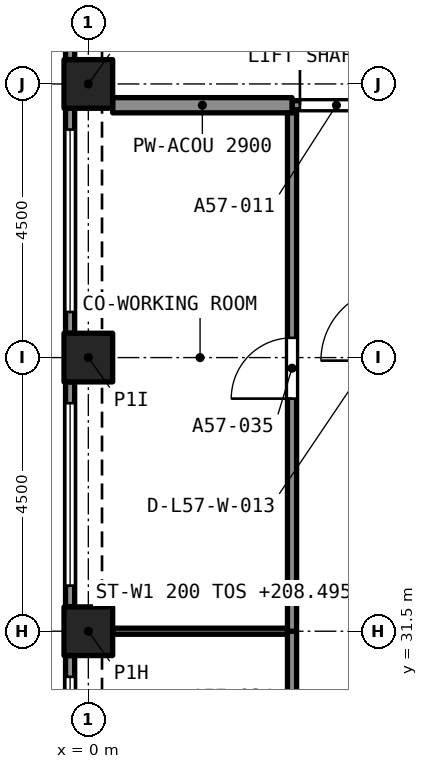
"""IFC4 building model, lengths in metres.
Left out: names, types, materials, properties, quantities, classifications, styles, units other than length and angle.
Written with IfcOpenShell. Run it as: python <this file> out.ifc"""

import sys

from ifc_helpers import new_model, si_unit, direction, frame, frame_2d, origin, origin_2d, place, context, subcontext, project, spatial, rectangle, extrude, element, fill, save


model = new_model("IFC4")
c1 = context("Model", 3, precision=1e-05, world=origin(), true_north=direction((0.0, 1.0)))
c2 = subcontext(c1, "Body", "Model", "MODEL_VIEW")
j1 = project(units=[si_unit("LENGTHUNIT", "METRE"), si_unit("PLANEANGLEUNIT", "RADIAN")], contexts=[c1])
p1 = place(None, origin())
s1 = spatial("IfcSite", under=j1, at=p1, CompositionType="ELEMENT")
p2 = place(p1, origin())
s2 = spatial("IfcBuilding", under=s1, at=p2, CompositionType="ELEMENT")
p3 = place(p2, frame((0.0, 0.0, 206.895)))
s3 = spatial("IfcBuildingStorey", under=s2, at=p3, CompositionType="ELEMENT", Elevation=206.895)
for number, where, z_axis, x_axis in (
    (1, (0.0, 31.5, 0.0), (0.0, 0.0, 1.0), (1.0, 0.0, 0.0)),
    (2, (0.0, 36.0, 0.0), (0.0, 0.0, 1.0), (1.0, 0.0, 0.0)),
    (3, (0.0, 40.5, 0.0), (0.0, 0.0, 1.0), (1.0, 0.0, 0.0)),
):
    element("IfcColumn", number, at=place(p3, frame(where, z_axis=z_axis, x_axis=x_axis)), inside=s3, PredefinedType="COLUMN", context=c2, shape_type="SweptSolid", body=[
        extrude(rectangle(XDim=0.8, YDim=0.8, at=origin_2d()), origin(), (0.0, 0.0, 1.0), 3.2),
    ])
p4 = place(p3, frame((-0.3, 40.9, 0.0), z_axis=(0.0, 0.0, 1.0), x_axis=(0.0, 1.0, 0.0)))
e4 = element("IfcWall", 4, at=p4, inside=s3, PredefinedType="SOLIDWALL", context=c2, shape_type="SweptSolid", body=[
    extrude(rectangle(XDim=3.7, YDim=0.15, at=frame_2d((1.85, 0.0))), origin(), (0.0, 0.0, 1.0), 3.2),
])
p5 = place(p4, frame((0.35, 0.0, 0.45)))
e5 = element("IfcOpeningElement", 5, at=p5, cuts=e4, PredefinedType="OPENING", context=c2, shape_type="SweptSolid", body=[
    extrude(rectangle(XDim=3.0, YDim=1.95, at=frame_2d((1.5, 0.975))), frame((0.0, 0.085, 0.0), z_axis=(0.0, -1.0, 0.0), x_axis=(1.0, 0.0, 0.0)), (0.0, 0.0, 1.0), 0.17),
])
p6 = place(p3, frame((-0.3, 36.4, 0.0), z_axis=(0.0, 0.0, 1.0), x_axis=(0.0, 1.0, 0.0)))
e6 = element("IfcWall", 6, at=p6, inside=s3, PredefinedType="SOLIDWALL", context=c2, shape_type="SweptSolid", body=[
    extrude(rectangle(XDim=3.7, YDim=0.15, at=frame_2d((1.85, 0.0))), origin(), (0.0, 0.0, 1.0), 3.2),
])
p7 = place(p6, frame((0.35, 0.0, 0.45)))
e7 = element("IfcOpeningElement", 7, at=p7, cuts=e6, PredefinedType="OPENING", context=c2, shape_type="SweptSolid", body=[
    extrude(rectangle(XDim=3.0, YDim=1.95, at=frame_2d((1.5, 0.975))), frame((0.0, 0.085, 0.0), z_axis=(0.0, -1.0, 0.0), x_axis=(1.0, 0.0, 0.0)), (0.0, 0.0, 1.0), 0.17),
])
p8 = place(p3, frame((-0.3, 31.9, 0.0), z_axis=(0.0, 0.0, 1.0), x_axis=(0.0, 1.0, 0.0)))
e8 = element("IfcWall", 8, at=p8, inside=s3, PredefinedType="SOLIDWALL", context=c2, shape_type="SweptSolid", body=[
    extrude(rectangle(XDim=3.7, YDim=0.15, at=frame_2d((1.85, 0.0))), origin(), (0.0, 0.0, 1.0), 3.2),
])
p9 = place(p8, frame((0.35, 0.0, 0.45)))
e9 = element("IfcOpeningElement", 9, at=p9, cuts=e8, PredefinedType="OPENING", context=c2, shape_type="SweptSolid", body=[
    extrude(rectangle(XDim=3.0, YDim=1.95, at=frame_2d((1.5, 0.975))), frame((0.0, 0.085, 0.0), z_axis=(0.0, -1.0, 0.0), x_axis=(1.0, 0.0, 0.0)), (0.0, 0.0, 1.0), 0.17),
])
p10 = place(p3, frame((-0.3, 27.4, 0.0), z_axis=(0.0, 0.0, 1.0), x_axis=(0.0, 1.0, 0.0)))
e10 = element("IfcWall", 10, at=p10, inside=s3, PredefinedType="SOLIDWALL", context=c2, shape_type="SweptSolid", body=[
    extrude(rectangle(XDim=3.7, YDim=0.15, at=frame_2d((1.85, 0.0))), origin(), (0.0, 0.0, 1.0), 3.2),
])
p11 = place(p10, frame((0.35, 0.0, 0.45)))
e11 = element("IfcOpeningElement", 11, at=p11, cuts=e10, PredefinedType="OPENING", context=c2, shape_type="SweptSolid", body=[
    extrude(rectangle(XDim=3.0, YDim=1.95, at=frame_2d((1.5, 0.975))), frame((0.0, 0.085, 0.0), z_axis=(0.0, -1.0, 0.0), x_axis=(1.0, 0.0, 0.0)), (0.0, 0.0, 1.0), 0.17),
])
p12 = place(p3, frame((3.35, 40.15, 0.0), z_axis=(0.0, 0.0, 1.0), x_axis=(1.0, 0.0, 0.0)))
e12 = element("IfcWall", 12, at=p12, inside=s3, PredefinedType="PARTITIONING", context=c2, shape_type="SweptSolid", body=[
    extrude(rectangle(XDim=1.5, YDim=0.15, at=frame_2d((0.75, 0.0))), origin(), (0.0, 0.0, 1.0), 2.9),
])
p13 = place(p12, frame((0.13, 0.0, 0.0)))
e13 = element("IfcOpeningElement", 13, at=p13, cuts=e12, PredefinedType="OPENING", context=c2, shape_type="SweptSolid", body=[
    extrude(rectangle(XDim=1.2, YDim=2.4, at=frame_2d((0.6, 1.2))), frame((0.0, 0.085, 0.0), z_axis=(0.0, -1.0, 0.0), x_axis=(1.0, 0.0, 0.0)), (0.0, 0.0, 1.0), 0.17),
])
p14 = place(p3, frame((0.4, 40.15, 0.0), z_axis=(0.0, 0.0, 1.0), x_axis=(1.0, 0.0, 0.0)))
e14 = element("IfcWall", 14, at=p14, inside=s3, PredefinedType="PARTITIONING", context=c2, shape_type="SweptSolid", body=[
    extrude(rectangle(XDim=2.95, YDim=0.25, at=frame_2d((1.475, 0.0))), origin(), (0.0, 0.0, 1.0), 2.9),
])
p15 = place(p3, frame((3.35, 27.35, 0.0), z_axis=(0.0, 0.0, 1.0), x_axis=(0.0, 1.0, 0.0)))
e15 = element("IfcWall", 15, at=p15, inside=s3, PredefinedType="PARTITIONING", context=c2, shape_type="SweptSolid", body=[
    extrude(rectangle(XDim=4.15, YDim=0.15, at=frame_2d((2.075, 0.0))), origin(), (0.0, 0.0, 1.0), 2.9),
])
p16 = place(p15, frame((1.575, 0.0, 0.0)))
e16 = element("IfcOpeningElement", 16, at=p16, cuts=e15, PredefinedType="OPENING", context=c2, shape_type="SweptSolid", body=[
    extrude(rectangle(XDim=1.0, YDim=2.1, at=frame_2d((0.5, 1.05))), frame((0.0, 0.085, 0.0), z_axis=(0.0, -1.0, 0.0), x_axis=(1.0, 0.0, 0.0)), (0.0, 0.0, 1.0), 0.17),
])
p17 = place(p3, frame((3.35, 31.5, 0.0), z_axis=(0.0, 0.0, 1.0), x_axis=(0.0, 1.0, 0.0)))
e17 = element("IfcWall", 17, at=p17, inside=s3, PredefinedType="PARTITIONING", context=c2, shape_type="SweptSolid", body=[
    extrude(rectangle(XDim=8.525, YDim=0.15, at=frame_2d((4.262, 0.0))), origin(), (0.0, 0.0, 1.0), 2.9),
])
p18 = place(p17, frame((3.825, 0.0, 0.0)))
e18 = element("IfcOpeningElement", 18, at=p18, cuts=e17, PredefinedType="OPENING", context=c2, shape_type="SweptSolid", body=[
    extrude(rectangle(XDim=1.0, YDim=2.1, at=frame_2d((0.5, 1.05))), frame((0.0, 0.085, 0.0), z_axis=(0.0, -1.0, 0.0), x_axis=(1.0, 0.0, 0.0)), (0.0, 0.0, 1.0), 0.17),
])
p19 = place(p3, frame((0.4, 31.5, 0.0), z_axis=(0.0, 0.0, 1.0), x_axis=(1.0, 0.0, 0.0)))
e19 = element("IfcWall", 19, at=p19, inside=s3, PredefinedType="PARTITIONING", context=c2, shape_type="SweptSolid", body=[
    extrude(rectangle(XDim=2.875, YDim=0.1, at=frame_2d((1.438, 0.0))), origin(), (0.0, 0.0, 1.0), 2.9),
])
p20 = place(p7, origin())
e20 = element("IfcWindow", 20, at=p20, inside=s3, PartitioningType="SINGLE_PANEL", PredefinedType="WINDOW", context=c2, shape_type="SweptSolid", body=[
    extrude(rectangle(XDim=3.0, YDim=1.95, at=frame_2d((1.5, 0.975))), frame((0.0, 0.03, 0.0), z_axis=(0.0, -1.0, 0.0), x_axis=(1.0, 0.0, 0.0)), (0.0, 0.0, 1.0), 0.06),
])
fill(e7, e20)
p21 = place(p9, origin())
e21 = element("IfcWindow", 21, at=p21, inside=s3, PartitioningType="SINGLE_PANEL", PredefinedType="WINDOW", context=c2, shape_type="SweptSolid", body=[
    extrude(rectangle(XDim=3.0, YDim=1.95, at=frame_2d((1.5, 0.975))), frame((0.0, 0.03, 0.0), z_axis=(0.0, -1.0, 0.0), x_axis=(1.0, 0.0, 0.0)), (0.0, 0.0, 1.0), 0.06),
])
fill(e9, e21)
p22 = place(p11, origin())
e22 = element("IfcWindow", 22, at=p22, inside=s3, PartitioningType="SINGLE_PANEL", PredefinedType="WINDOW", context=c2, shape_type="SweptSolid", body=[
    extrude(rectangle(XDim=3.0, YDim=1.95, at=frame_2d((1.5, 0.975))), frame((0.0, 0.03, 0.0), z_axis=(0.0, -1.0, 0.0), x_axis=(1.0, 0.0, 0.0)), (0.0, 0.0, 1.0), 0.06),
])
fill(e11, e22)
p23 = place(p13, origin())
e23 = element("IfcDoor", 23, at=p23, inside=s3, OperationType="SINGLE_SWING_LEFT", PredefinedType="DOOR", context=c2, shape_type="SweptSolid", body=[
    extrude(rectangle(XDim=1.2, YDim=2.4, at=frame_2d((0.6, 1.2))), frame((0.0, 0.025, 0.0), z_axis=(0.0, -1.0, 0.0), x_axis=(1.0, 0.0, 0.0)), (0.0, 0.0, 1.0), 0.05),
])
fill(e13, e23)
p24 = place(p18, origin())
e24 = element("IfcDoor", 24, at=p24, inside=s3, OperationType="SINGLE_SWING_RIGHT", PredefinedType="DOOR", context=c2, shape_type="SweptSolid", body=[
    extrude(rectangle(XDim=1.0, YDim=2.1, at=frame_2d((0.5, 1.05))), frame((0.0, 0.025, 0.0), z_axis=(0.0, -1.0, 0.0), x_axis=(1.0, 0.0, 0.0)), (0.0, 0.0, 1.0), 0.05),
])
fill(e18, e24)
save(model, sys.argv[1])
